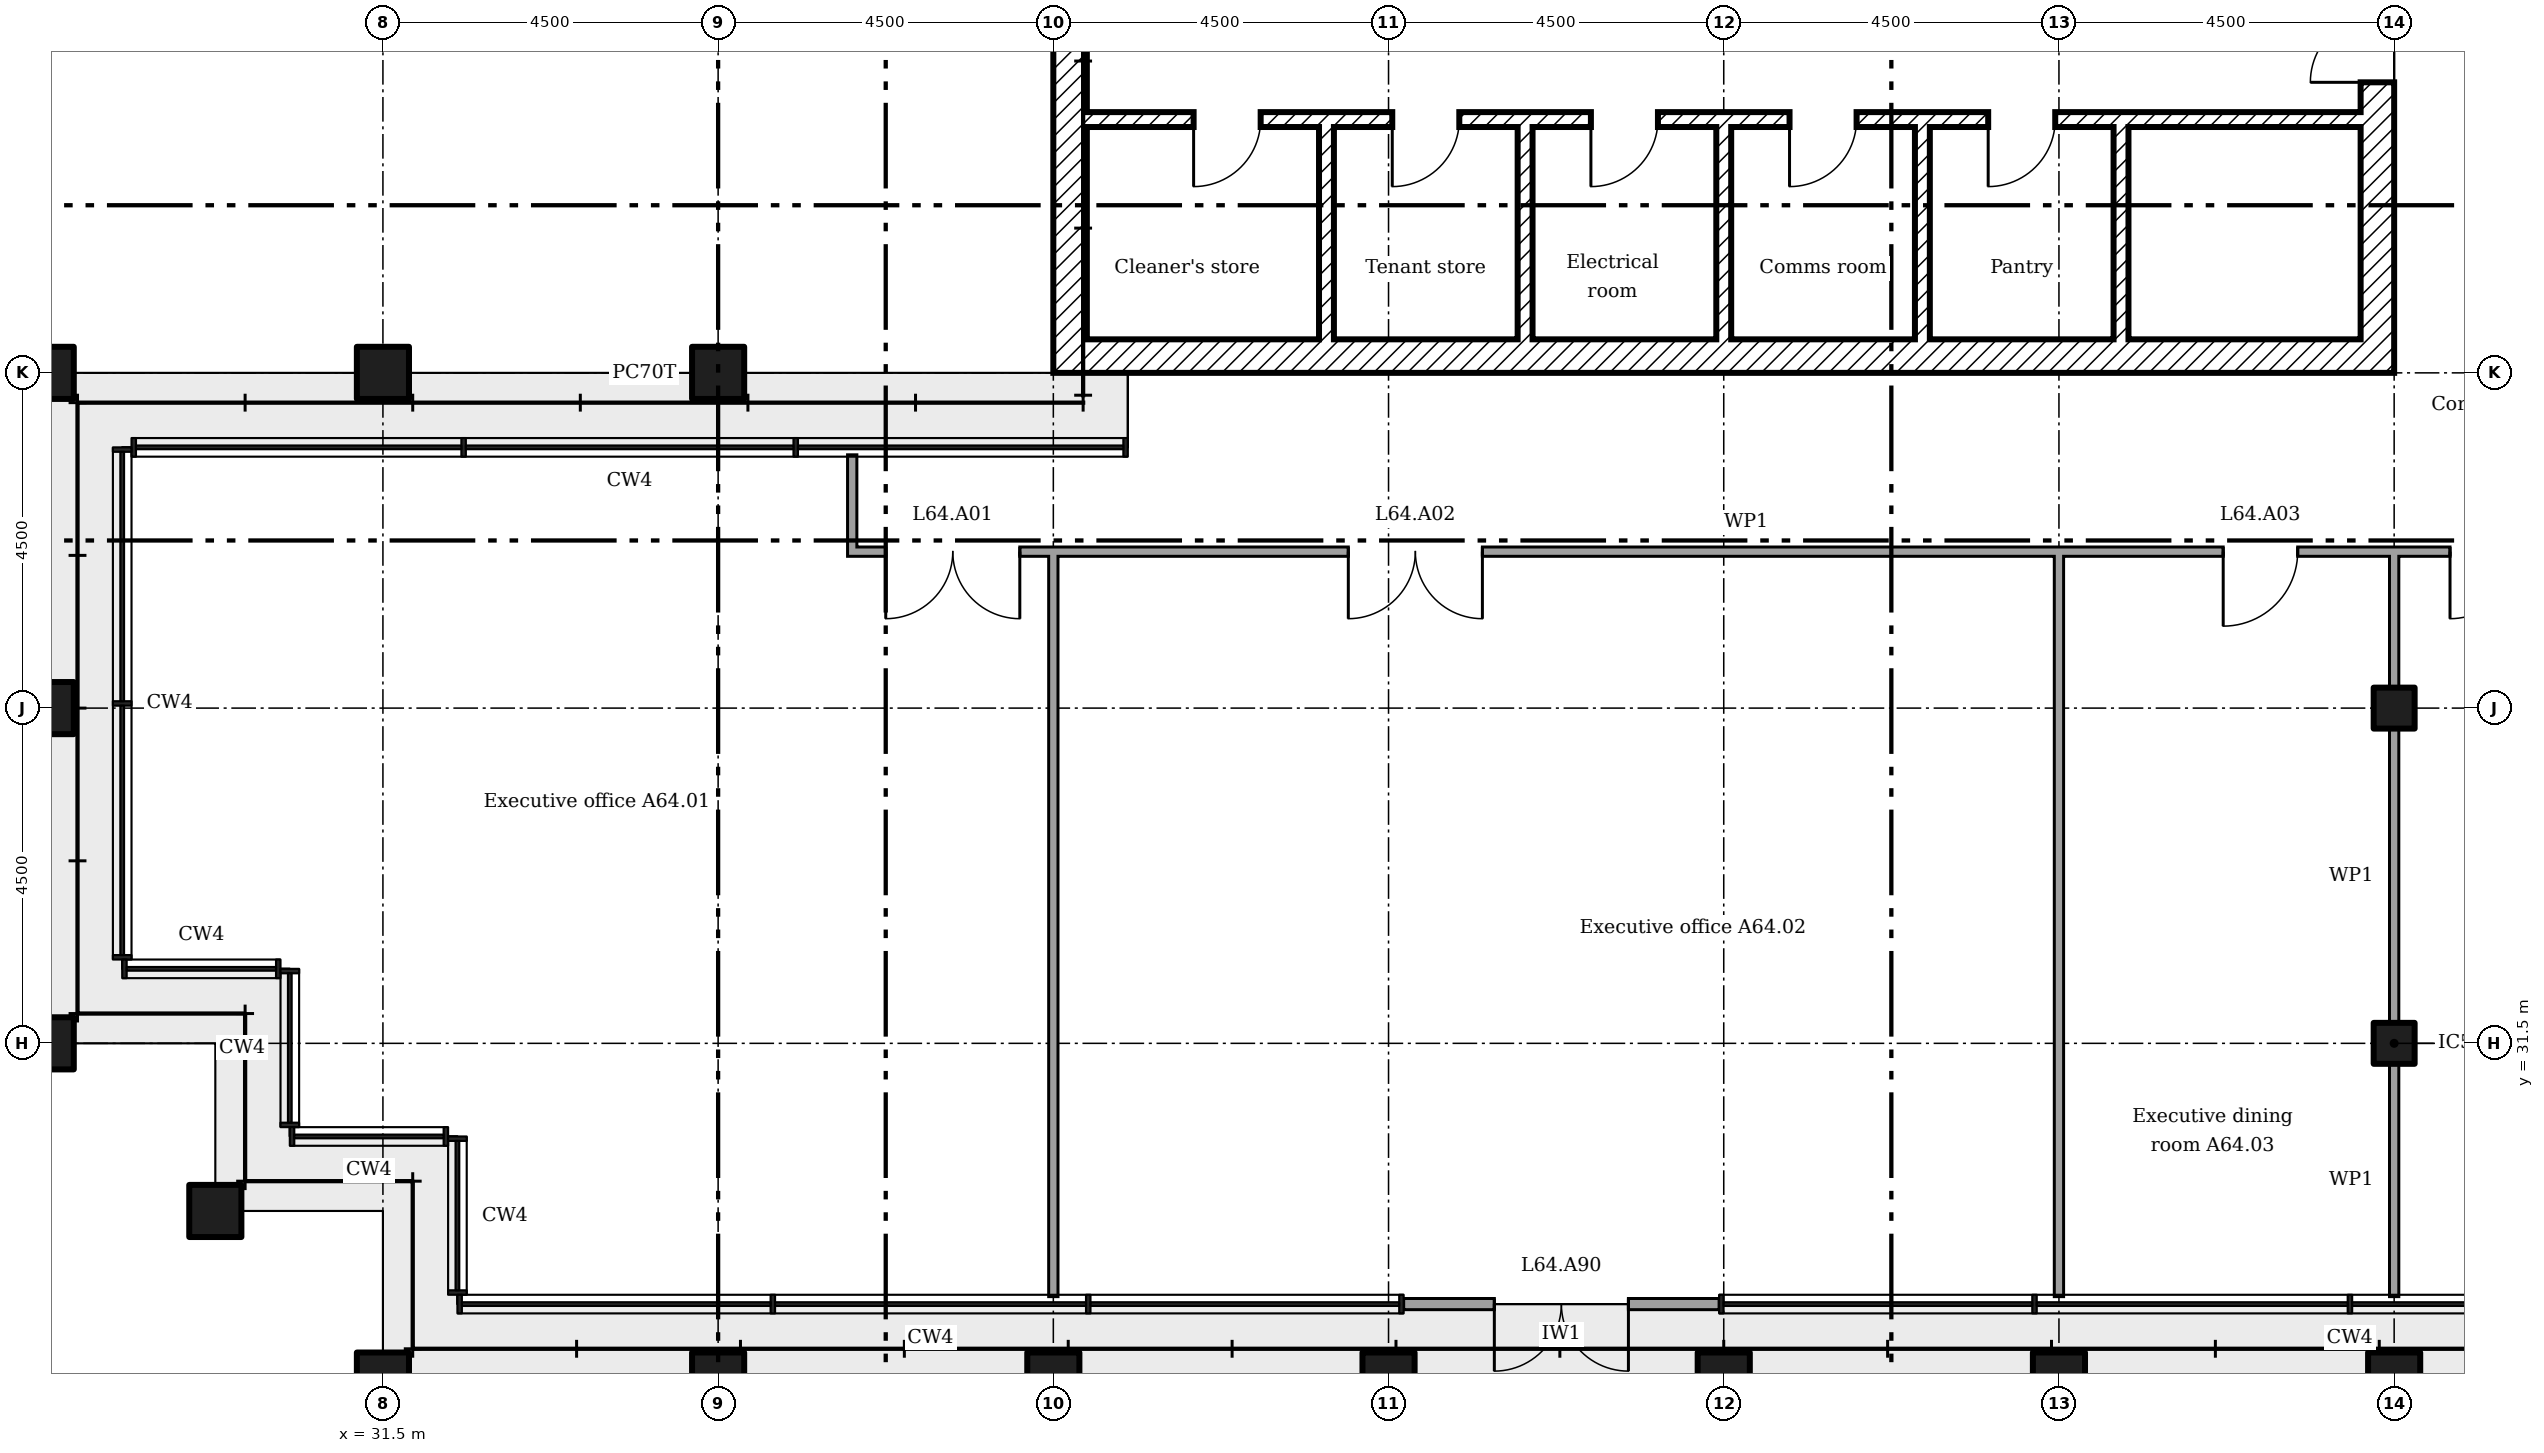
"""IFC4 building model, lengths in metres.
Left out: names, types, materials, properties, quantities, classifications, styles, units other than length and angle.
Written with IfcOpenShell. Run it as: python <this file> out.ifc"""

import sys

from ifc_helpers import new_model, si_unit, direction, frame, frame_2d, origin, origin_2d, place, context, subcontext, project, spatial, rectangle, extrude, element, fill, save


model = new_model("IFC4")
c1 = context("Model", 3, precision=1e-05, world=origin(), true_north=direction((0.0, 1.0)))
c2 = subcontext(c1, "Body", "Model", "MODEL_VIEW")
j1 = project(units=[si_unit("LENGTHUNIT", "METRE"), si_unit("PLANEANGLEUNIT", "RADIAN")], contexts=[c1])
p1 = place(None, origin())
s1 = spatial("IfcSite", under=j1, at=p1, CompositionType="ELEMENT")
p2 = place(p1, origin())
s2 = spatial("IfcBuilding", under=s1, at=p2, CompositionType="ELEMENT")
p3 = place(p2, frame((0.0, 0.0, 251.0)))
s3 = spatial("IfcBuildingStorey", under=s2, at=p3, CompositionType="ELEMENT", Elevation=251.0)
for number, where in (
    (1, (31.5, 27.0, 0.0)),
    (2, (36.0, 27.0, 0.0)),
    (3, (40.5, 27.0, 0.0)),
    (4, (45.0, 27.0, 0.0)),
    (5, (49.5, 27.0, 0.0)),
    (6, (54.0, 27.0, 0.0)),
    (7, (58.5, 27.0, 0.0)),
    (8, (36.0, 40.5, 0.0)),
    (9, (31.5, 40.5, 0.0)),
    (10, (27.0, 40.5, 0.0)),
    (11, (27.0, 36.0, 0.0)),
    (12, (27.0, 31.5, 0.0)),
    (13, (29.25, 29.25, 0.0)),
):
    element("IfcColumn", number, at=place(p3, frame(where)), inside=s3, PredefinedType="COLUMN", context=c2, shape_type="SweptSolid", body=[
        extrude(rectangle(XDim=0.7, YDim=0.7, at=origin_2d()), origin(), (0.0, 0.0, 1.0), 4.2),
    ])
for number, where in (
    (14, (58.5, 31.5, 0.0)),
    (15, (58.5, 36.0, 0.0)),
):
    element("IfcColumn", number, at=place(p3, frame(where)), inside=s3, PredefinedType="COLUMN", context=c2, shape_type="SweptSolid", body=[
        extrude(rectangle(XDim=0.55, YDim=0.55, at=origin_2d()), origin(), (0.0, 0.0, 1.0), 4.2),
    ])
p4 = place(p3, frame((45.203, 28.0, 0.0)))
e16 = element("IfcWall", 16, at=p4, inside=s3, PredefinedType="SOLIDWALL", context=c2, shape_type="SweptSolid", body=[
    extrude(rectangle(XDim=4.234, YDim=0.15, at=frame_2d((2.117, 0.0))), origin(), (0.0, 0.0, 1.0), 4.025),
])
p5 = place(p4, frame((1.217, 0.0, 0.0)))
e17 = element("IfcOpeningElement", 17, at=p5, cuts=e16, PredefinedType="OPENING", context=c2, shape_type="SweptSolid", body=[
    extrude(rectangle(XDim=1.8, YDim=2.4, at=frame_2d((0.9, 1.2))), frame((0.0, 0.085, 0.0), z_axis=(0.0, -1.0, 0.0), x_axis=(1.0, 0.0, 0.0)), (0.0, 0.0, 1.0), 0.17),
])
p6 = place(p3, frame((58.275, 40.5, 0.0), z_axis=(0.0, 0.0, 1.0), x_axis=(0.0, 1.0, 0.0)))
e18 = element("IfcWall", 18, at=p6, inside=s3, PredefinedType="SHEAR", context=c2, shape_type="SweptSolid", body=[
    extrude(rectangle(XDim=18.0, YDim=0.45, at=frame_2d((9.0, 0.0))), origin(), (0.0, 0.0, 1.0), 3.78),
])
p7 = place(p6, frame((13.15, 0.0, 0.0)))
e19 = element("IfcOpeningElement", 19, at=p7, cuts=e18, PredefinedType="OPENING", context=c2, shape_type="SweptSolid", body=[
    extrude(rectangle(XDim=1.2, YDim=2.1, at=frame_2d((0.6, 1.05))), frame((0.0, 0.235, 0.0), z_axis=(0.0, -1.0, 0.0), x_axis=(1.0, 0.0, 0.0)), (0.0, 0.0, 1.0), 0.47),
])
p8 = place(p6, frame((3.9, 0.0, 0.0)))
e20 = element("IfcOpeningElement", 20, at=p8, cuts=e18, PredefinedType="OPENING", context=c2, shape_type="SweptSolid", body=[
    extrude(rectangle(XDim=1.8, YDim=2.1, at=frame_2d((0.9, 1.05))), frame((0.0, 0.235, 0.0), z_axis=(0.0, -1.0, 0.0), x_axis=(1.0, 0.0, 0.0)), (0.0, 0.0, 1.0), 0.47),
])
p9 = place(p6, frame((11.525, 0.0, 0.0)))
e21 = element("IfcOpeningElement", 21, at=p9, cuts=e18, PredefinedType="OPENING", context=c2, shape_type="SweptSolid", body=[
    extrude(rectangle(XDim=1.0, YDim=2.1, at=frame_2d((0.5, 1.05))), frame((0.0, 0.235, 0.0), z_axis=(0.0, -1.0, 0.0), x_axis=(1.0, 0.0, 0.0)), (0.0, 0.0, 1.0), 0.47),
])
p10 = place(p3, frame((40.5, 40.725, 0.0)))
e22 = element("IfcWall", 22, at=p10, inside=s3, PredefinedType="SHEAR", context=c2, shape_type="SweptSolid", body=[
    extrude(rectangle(XDim=17.55, YDim=0.45, at=frame_2d((8.775, 0.0))), origin(), (0.0, 0.0, 1.0), 3.78),
])
p11 = place(p3, frame((40.725, 40.95, 0.0), z_axis=(0.0, 0.0, 1.0), x_axis=(0.0, 1.0, 0.0)))
e23 = element("IfcWall", 23, at=p11, inside=s3, PredefinedType="SHEAR", context=c2, shape_type="SweptSolid", body=[
    extrude(rectangle(XDim=17.1, YDim=0.45, at=frame_2d((8.55, 0.0))), origin(), (0.0, 0.0, 1.0), 3.78),
])
for number, where, z_axis, x_axis in (
    (24, (44.167, 40.95, 0.0), (0.0, 0.0, 1.0), (0.0, 1.0, 0.0)),
    (25, (46.833, 40.95, 0.0), (0.0, 0.0, 1.0), (0.0, 1.0, 0.0)),
    (26, (49.5, 40.95, 0.0), (0.0, 0.0, 1.0), (0.0, 1.0, 0.0)),
    (27, (52.167, 40.95, 0.0), (0.0, 0.0, 1.0), (0.0, 1.0, 0.0)),
    (28, (54.833, 40.95, 0.0), (0.0, 0.0, 1.0), (0.0, 1.0, 0.0)),
):
    element("IfcWall", number, at=place(p3, frame(where, z_axis=z_axis, x_axis=x_axis)), inside=s3, PredefinedType="SHEAR", context=c2, shape_type="SweptSolid", body=[
        extrude(rectangle(XDim=2.85, YDim=0.2, at=frame_2d((1.425, 0.0))), origin(), (0.0, 0.0, 1.0), 3.78),
    ])
p12 = place(p3, frame((40.95, 43.9, 0.0)))
e29 = element("IfcWall", 29, at=p12, inside=s3, PredefinedType="SHEAR", context=c2, shape_type="SweptSolid", body=[
    extrude(rectangle(XDim=17.1, YDim=0.2, at=frame_2d((8.55, 0.0))), origin(), (0.0, 0.0, 1.0), 3.78),
])
p13 = place(p12, frame((1.433, 0.0, 0.0)))
e30 = element("IfcOpeningElement", 30, at=p13, cuts=e29, PredefinedType="OPENING", context=c2, shape_type="SweptSolid", body=[
    extrude(rectangle(XDim=0.9, YDim=2.1, at=frame_2d((0.45, 1.05))), frame((0.0, 0.11, 0.0), z_axis=(0.0, -1.0, 0.0), x_axis=(1.0, 0.0, 0.0)), (0.0, 0.0, 1.0), 0.22),
])
p14 = place(p12, frame((4.1, 0.0, 0.0)))
e31 = element("IfcOpeningElement", 31, at=p14, cuts=e29, PredefinedType="OPENING", context=c2, shape_type="SweptSolid", body=[
    extrude(rectangle(XDim=0.9, YDim=2.1, at=frame_2d((0.45, 1.05))), frame((0.0, 0.11, 0.0), z_axis=(0.0, -1.0, 0.0), x_axis=(1.0, 0.0, 0.0)), (0.0, 0.0, 1.0), 0.22),
])
p15 = place(p12, frame((6.767, 0.0, 0.0)))
e32 = element("IfcOpeningElement", 32, at=p15, cuts=e29, PredefinedType="OPENING", context=c2, shape_type="SweptSolid", body=[
    extrude(rectangle(XDim=0.9, YDim=2.1, at=frame_2d((0.45, 1.05))), frame((0.0, 0.11, 0.0), z_axis=(0.0, -1.0, 0.0), x_axis=(1.0, 0.0, 0.0)), (0.0, 0.0, 1.0), 0.22),
])
p16 = place(p12, frame((9.433, 0.0, 0.0)))
e33 = element("IfcOpeningElement", 33, at=p16, cuts=e29, PredefinedType="OPENING", context=c2, shape_type="SweptSolid", body=[
    extrude(rectangle(XDim=0.9, YDim=2.1, at=frame_2d((0.45, 1.05))), frame((0.0, 0.11, 0.0), z_axis=(0.0, -1.0, 0.0), x_axis=(1.0, 0.0, 0.0)), (0.0, 0.0, 1.0), 0.22),
])
p17 = place(p12, frame((12.1, 0.0, 0.0)))
e34 = element("IfcOpeningElement", 34, at=p17, cuts=e29, PredefinedType="OPENING", context=c2, shape_type="SweptSolid", body=[
    extrude(rectangle(XDim=0.9, YDim=2.1, at=frame_2d((0.45, 1.05))), frame((0.0, 0.11, 0.0), z_axis=(0.0, -1.0, 0.0), x_axis=(1.0, 0.0, 0.0)), (0.0, 0.0, 1.0), 0.22),
])
p18 = place(p3, frame((37.738, 38.1, 0.0)))
e35 = element("IfcWall", 35, at=p18, inside=s3, PredefinedType="PARTITIONING", context=c2, shape_type="SweptSolid", body=[
    extrude(rectangle(XDim=24.125, YDim=0.125, at=frame_2d((12.062, 0.0))), origin(), (0.0, 0.0, 1.0), 4.025),
])
p19 = place(p18, frame((0.512, 0.0, 0.0)))
e36 = element("IfcOpeningElement", 36, at=p19, cuts=e35, PredefinedType="OPENING", context=c2, shape_type="SweptSolid", body=[
    extrude(rectangle(XDim=1.8, YDim=2.1, at=frame_2d((0.9, 1.05))), frame((0.0, 0.073, 0.0), z_axis=(0.0, -1.0, 0.0), x_axis=(1.0, 0.0, 0.0)), (0.0, 0.0, 1.0), 0.145),
])
p20 = place(p18, frame((6.722, 0.0, 0.0)))
e37 = element("IfcOpeningElement", 37, at=p20, cuts=e35, PredefinedType="OPENING", context=c2, shape_type="SweptSolid", body=[
    extrude(rectangle(XDim=1.8, YDim=2.1, at=frame_2d((0.9, 1.05))), frame((0.0, 0.073, 0.0), z_axis=(0.0, -1.0, 0.0), x_axis=(1.0, 0.0, 0.0)), (0.0, 0.0, 1.0), 0.145),
])
p21 = place(p18, frame((18.468, 0.0, 0.0)))
e38 = element("IfcOpeningElement", 38, at=p21, cuts=e35, PredefinedType="OPENING", context=c2, shape_type="SweptSolid", body=[
    extrude(rectangle(XDim=1.0, YDim=2.1, at=frame_2d((0.5, 1.05))), frame((0.0, 0.073, 0.0), z_axis=(0.0, -1.0, 0.0), x_axis=(1.0, 0.0, 0.0)), (0.0, 0.0, 1.0), 0.145),
])
p22 = place(p18, frame((21.512, 0.0, 0.0)))
e39 = element("IfcOpeningElement", 39, at=p22, cuts=e35, PredefinedType="OPENING", context=c2, shape_type="SweptSolid", body=[
    extrude(rectangle(XDim=1.8, YDim=2.1, at=frame_2d((0.9, 1.05))), frame((0.0, 0.073, 0.0), z_axis=(0.0, -1.0, 0.0), x_axis=(1.0, 0.0, 0.0)), (0.0, 0.0, 1.0), 0.145),
])
p23 = place(p3, frame((37.8, 38.163, 0.0), z_axis=(0.0, 0.0, 1.0), x_axis=(0.0, 1.0, 0.0)))
e40 = element("IfcWall", 40, at=p23, inside=s3, PredefinedType="PARTITIONING", context=c2, shape_type="SweptSolid", body=[
    extrude(rectangle(XDim=1.237, YDim=0.125, at=frame_2d((0.619, 0.0))), origin(), (0.0, 0.0, 1.0), 4.025),
])
for number, where, z_axis, x_axis in (
    (41, (40.5, 28.1, 0.0), (0.0, 0.0, 1.0), (0.0, 1.0, 0.0)),
    (42, (54.0, 28.1, 0.0), (0.0, 0.0, 1.0), (0.0, 1.0, 0.0)),
):
    element("IfcWall", number, at=place(p3, frame(where, z_axis=z_axis, x_axis=x_axis)), inside=s3, PredefinedType="PARTITIONING", context=c2, shape_type="SweptSolid", body=[
        extrude(rectangle(XDim=10.0, YDim=0.125, at=frame_2d((5.0, 0.0))), origin(), (0.0, 0.0, 1.0), 3.341),
    ])
p24 = place(p3, frame((58.5, 28.1, 0.0), z_axis=(0.0, 0.0, 1.0), x_axis=(0.0, 1.0, 0.0)))
e43 = element("IfcWall", 43, at=p24, inside=s3, PredefinedType="PARTITIONING", context=c2, shape_type="SweptSolid", body=[
    extrude(rectangle(XDim=3.125, YDim=0.125, at=frame_2d((1.562, 0.0))), origin(), (0.0, 0.0, 1.0), 3.251),
])
p25 = place(p3, frame((58.5, 31.775, 0.0), z_axis=(0.0, 0.0, 1.0), x_axis=(0.0, 1.0, 0.0)))
e44 = element("IfcWall", 44, at=p25, inside=s3, PredefinedType="PARTITIONING", context=c2, shape_type="SweptSolid", body=[
    extrude(rectangle(XDim=3.95, YDim=0.125, at=frame_2d((1.975, 0.0))), origin(), (0.0, 0.0, 1.0), 3.251),
])
p26 = place(p3, frame((58.5, 36.275, 0.0), z_axis=(0.0, 0.0, 1.0), x_axis=(0.0, 1.0, 0.0)))
e45 = element("IfcWall", 45, at=p26, inside=s3, PredefinedType="PARTITIONING", context=c2, shape_type="SweptSolid", body=[
    extrude(rectangle(XDim=1.825, YDim=0.125, at=frame_2d((0.913, 0.0))), origin(), (0.0, 0.0, 1.0), 3.251),
])
p27 = place(p5, frame((1.8, 0.0, 0.0), x_axis=(-1.0, 0.0, 0.0)))
e46 = element("IfcDoor", 46, at=p27, inside=s3, OperationType="DOUBLE_DOOR_DOUBLE_SWING", PredefinedType="NOTDEFINED", context=c2, shape_type="SweptSolid", body=[
    extrude(rectangle(XDim=1.8, YDim=2.4, at=frame_2d((0.9, 1.2))), frame((0.0, 0.025, 0.0), z_axis=(0.0, -1.0, 0.0), x_axis=(1.0, 0.0, 0.0)), (0.0, 0.0, 1.0), 0.05),
])
fill(e17, e46)
p28 = place(p8, origin())
e47 = element("IfcDoor", 47, at=p28, inside=s3, OperationType="DOUBLE_DOOR_SINGLE_SWING", PredefinedType="DOOR", context=c2, shape_type="SweptSolid", body=[
    extrude(rectangle(XDim=1.8, YDim=2.1, at=frame_2d((0.9, 1.05))), frame((0.0, 0.025, 0.0), z_axis=(0.0, -1.0, 0.0), x_axis=(1.0, 0.0, 0.0)), (0.0, 0.0, 1.0), 0.05),
])
fill(e20, e47)
p29 = place(p13, frame((0.9, 0.0, 0.0), x_axis=(-1.0, 0.0, 0.0)))
e48 = element("IfcDoor", 48, at=p29, inside=s3, OperationType="SINGLE_SWING_LEFT", PredefinedType="DOOR", context=c2, shape_type="SweptSolid", body=[
    extrude(rectangle(XDim=0.9, YDim=2.1, at=frame_2d((0.45, 1.05))), frame((0.0, 0.025, 0.0), z_axis=(0.0, -1.0, 0.0), x_axis=(1.0, 0.0, 0.0)), (0.0, 0.0, 1.0), 0.05),
])
fill(e30, e48)
p30 = place(p14, frame((0.9, 0.0, 0.0), x_axis=(-1.0, 0.0, 0.0)))
e49 = element("IfcDoor", 49, at=p30, inside=s3, OperationType="SINGLE_SWING_LEFT", PredefinedType="DOOR", context=c2, shape_type="SweptSolid", body=[
    extrude(rectangle(XDim=0.9, YDim=2.1, at=frame_2d((0.45, 1.05))), frame((0.0, 0.025, 0.0), z_axis=(0.0, -1.0, 0.0), x_axis=(1.0, 0.0, 0.0)), (0.0, 0.0, 1.0), 0.05),
])
fill(e31, e49)
p31 = place(p15, frame((0.9, 0.0, 0.0), x_axis=(-1.0, 0.0, 0.0)))
e50 = element("IfcDoor", 50, at=p31, inside=s3, OperationType="SINGLE_SWING_LEFT", PredefinedType="DOOR", context=c2, shape_type="SweptSolid", body=[
    extrude(rectangle(XDim=0.9, YDim=2.1, at=frame_2d((0.45, 1.05))), frame((0.0, 0.025, 0.0), z_axis=(0.0, -1.0, 0.0), x_axis=(1.0, 0.0, 0.0)), (0.0, 0.0, 1.0), 0.05),
])
fill(e32, e50)
p32 = place(p16, frame((0.9, 0.0, 0.0), x_axis=(-1.0, 0.0, 0.0)))
e51 = element("IfcDoor", 51, at=p32, inside=s3, OperationType="SINGLE_SWING_LEFT", PredefinedType="DOOR", context=c2, shape_type="SweptSolid", body=[
    extrude(rectangle(XDim=0.9, YDim=2.1, at=frame_2d((0.45, 1.05))), frame((0.0, 0.025, 0.0), z_axis=(0.0, -1.0, 0.0), x_axis=(1.0, 0.0, 0.0)), (0.0, 0.0, 1.0), 0.05),
])
fill(e33, e51)
p33 = place(p17, frame((0.9, 0.0, 0.0), x_axis=(-1.0, 0.0, 0.0)))
e52 = element("IfcDoor", 52, at=p33, inside=s3, OperationType="SINGLE_SWING_LEFT", PredefinedType="DOOR", context=c2, shape_type="SweptSolid", body=[
    extrude(rectangle(XDim=0.9, YDim=2.1, at=frame_2d((0.45, 1.05))), frame((0.0, 0.025, 0.0), z_axis=(0.0, -1.0, 0.0), x_axis=(1.0, 0.0, 0.0)), (0.0, 0.0, 1.0), 0.05),
])
fill(e34, e52)
p34 = place(p19, frame((1.8, 0.0, 0.0), x_axis=(-1.0, 0.0, 0.0)))
e53 = element("IfcDoor", 53, at=p34, inside=s3, OperationType="DOUBLE_DOOR_SINGLE_SWING", PredefinedType="DOOR", context=c2, shape_type="SweptSolid", body=[
    extrude(rectangle(XDim=1.8, YDim=2.1, at=frame_2d((0.9, 1.05))), frame((0.0, 0.025, 0.0), z_axis=(0.0, -1.0, 0.0), x_axis=(1.0, 0.0, 0.0)), (0.0, 0.0, 1.0), 0.05),
])
fill(e36, e53)
p35 = place(p20, frame((1.8, 0.0, 0.0), x_axis=(-1.0, 0.0, 0.0)))
e54 = element("IfcDoor", 54, at=p35, inside=s3, OperationType="DOUBLE_DOOR_SINGLE_SWING", PredefinedType="DOOR", context=c2, shape_type="SweptSolid", body=[
    extrude(rectangle(XDim=1.8, YDim=2.1, at=frame_2d((0.9, 1.05))), frame((0.0, 0.025, 0.0), z_axis=(0.0, -1.0, 0.0), x_axis=(1.0, 0.0, 0.0)), (0.0, 0.0, 1.0), 0.05),
])
fill(e37, e54)
p36 = place(p21, frame((1.0, 0.0, 0.0), x_axis=(-1.0, 0.0, 0.0)))
e55 = element("IfcDoor", 55, at=p36, inside=s3, OperationType="SINGLE_SWING_LEFT", PredefinedType="DOOR", context=c2, shape_type="SweptSolid", body=[
    extrude(rectangle(XDim=1.0, YDim=2.1, at=frame_2d((0.5, 1.05))), frame((0.0, 0.025, 0.0), z_axis=(0.0, -1.0, 0.0), x_axis=(1.0, 0.0, 0.0)), (0.0, 0.0, 1.0), 0.05),
])
fill(e38, e55)
p37 = place(p22, frame((1.8, 0.0, 0.0), x_axis=(-1.0, 0.0, 0.0)))
e56 = element("IfcDoor", 56, at=p37, inside=s3, OperationType="DOUBLE_DOOR_SINGLE_SWING", PredefinedType="DOOR", context=c2, shape_type="SweptSolid", body=[
    extrude(rectangle(XDim=1.8, YDim=2.1, at=frame_2d((0.9, 1.05))), frame((0.0, 0.025, 0.0), z_axis=(0.0, -1.0, 0.0), x_axis=(1.0, 0.0, 0.0)), (0.0, 0.0, 1.0), 0.05),
])
fill(e39, e56)
save(model, sys.argv[1])
